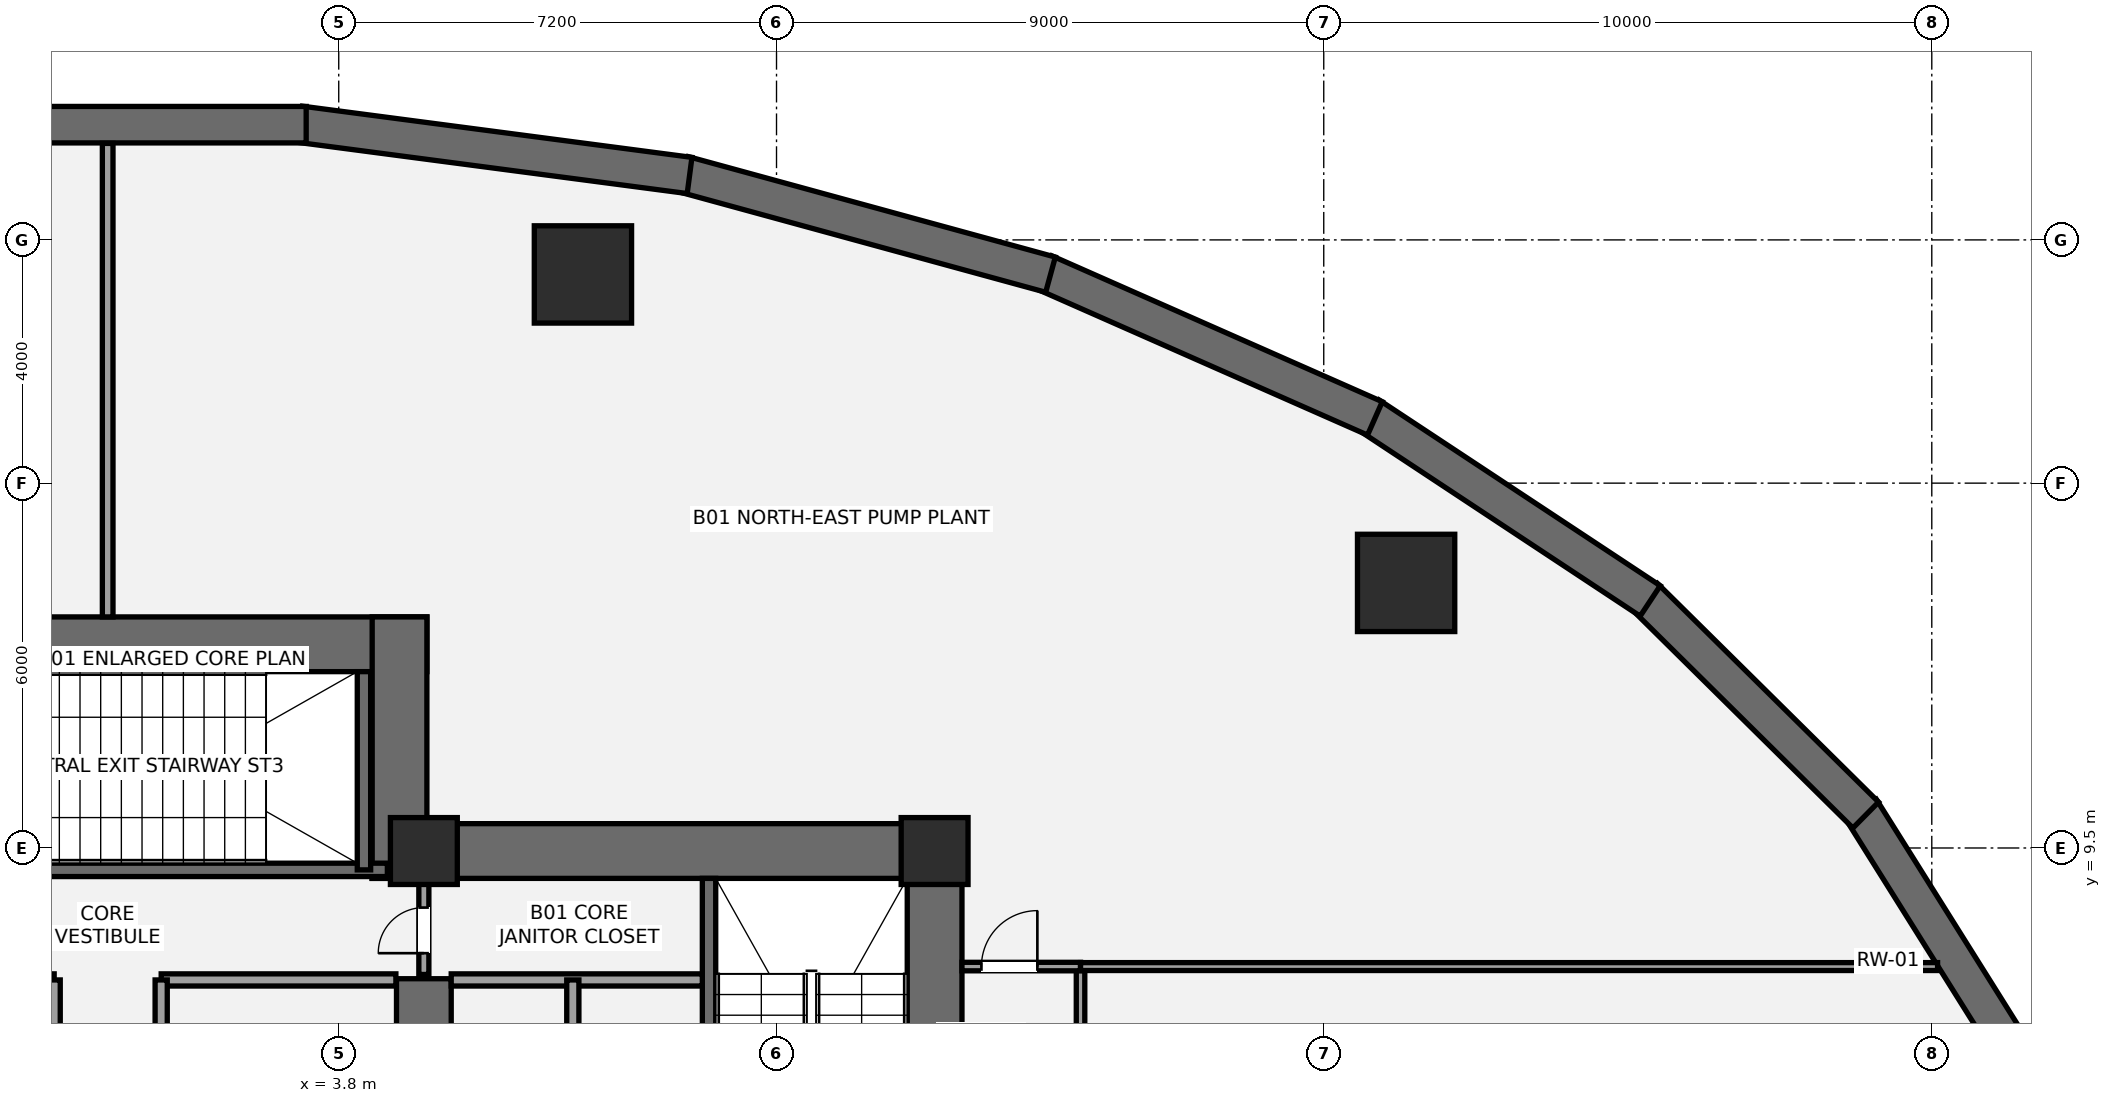
"""IFC4 building model, lengths in metres.
Left out: names, types, materials, properties, quantities, classifications, styles, units other than length and angle.
Written with IfcOpenShell. Run it as: python <this file> out.ifc"""

import sys

from ifc_helpers import new_model, si_unit, direction, frame, frame_2d, origin, origin_2d, place, context, subcontext, project, spatial, rectangle, hollow_circle, extrude, element, fill, save


model = new_model("IFC4")
c1 = context("Model", 3, precision=1e-05, world=origin(), true_north=direction((0.0, 1.0)))
c2 = subcontext(c1, "Body", "Model", "MODEL_VIEW")
j1 = project(units=[si_unit("LENGTHUNIT", "METRE"), si_unit("PLANEANGLEUNIT", "RADIAN")], contexts=[c1])
p1 = place(None, origin())
s1 = spatial("IfcSite", under=j1, at=p1, CompositionType="ELEMENT")
p2 = place(p1, origin())
s2 = spatial("IfcBuilding", under=s1, at=p2, CompositionType="ELEMENT")
p3 = place(p2, frame((0.0, 0.0, -4.4)))
s3 = spatial("IfcBuildingStorey", under=s2, at=p3, CompositionType="ELEMENT", Elevation=-4.4)
p4 = place(p3, frame((31.341, 6.143, 0.0), z_axis=(0.0, 0.0, 1.0), x_axis=(-0.531244363113, 0.847218641592, 0.0)))
e1 = element("IfcWall", 1, at=p4, inside=s3, PredefinedType="USERDEFINED", context=c2, shape_type="SweptSolid", body=[
    extrude(rectangle(XDim=4.72, YDim=0.6, at=frame_2d((2.36, 0.0))), origin(), (0.0, 0.0, 1.0), 4.4),
])
p5 = place(p3, frame((28.914, 10.042, 0.0), z_axis=(0.0, 0.0, 1.0), x_axis=(-0.711105403666, 0.70308541791, 0.0)))
e2 = element("IfcWall", 2, at=p5, inside=s3, PredefinedType="USERDEFINED", context=c2, shape_type="SweptSolid", body=[
    extrude(rectangle(XDim=5.114, YDim=0.6, at=frame_2d((2.557, 0.0))), origin(), (0.0, 0.0, 1.0), 4.4),
])
p6 = place(p3, frame((25.369, 13.563, 0.0), z_axis=(0.0, 0.0, 1.0), x_axis=(-0.834367518908, 0.551208529861, 0.0)))
e3 = element("IfcWall", 3, at=p6, inside=s3, PredefinedType="USERDEFINED", context=c2, shape_type="SweptSolid", body=[
    extrude(rectangle(XDim=5.542, YDim=0.6, at=frame_2d((2.771, 0.0))), origin(), (0.0, 0.0, 1.0), 4.4),
])
p7 = place(p3, frame((20.841, 16.565, 0.0), z_axis=(0.0, 0.0, 1.0), x_axis=(-0.91483072277, 0.403837527574, 0.0)))
e4 = element("IfcWall", 4, at=p7, inside=s3, PredefinedType="USERDEFINED", context=c2, shape_type="SweptSolid", body=[
    extrude(rectangle(XDim=5.94, YDim=0.6, at=frame_2d((2.97, 0.0))), origin(), (0.0, 0.0, 1.0), 4.4),
])
p8 = place(p3, frame((15.506, 18.929, 0.0), z_axis=(0.0, 0.0, 1.0), x_axis=(-0.964548276597, 0.263906464707, 0.0)))
e5 = element("IfcWall", 5, at=p8, inside=s3, PredefinedType="USERDEFINED", context=c2, shape_type="SweptSolid", body=[
    extrude(rectangle(XDim=6.257, YDim=0.6, at=frame_2d((3.128, 0.0))), origin(), (0.0, 0.0, 1.0), 4.4),
])
p9 = place(p3, frame((9.57, 20.56, 0.0), z_axis=(0.0, 0.0, 1.0), x_axis=(-0.991471782517, 0.130321542624, 0.0)))
e6 = element("IfcWall", 6, at=p9, inside=s3, PredefinedType="USERDEFINED", context=c2, shape_type="SweptSolid", body=[
    extrude(rectangle(XDim=6.459, YDim=0.6, at=frame_2d((3.23, 0.0))), origin(), (0.0, 0.0, 1.0), 4.4),
])
p10 = place(p3, frame((3.265, 21.395, 0.0), z_axis=(0.0, 0.0, 1.0), x_axis=(-1.0, 0.0, 0.0)))
e7 = element("IfcWall", 7, at=p10, inside=s3, PredefinedType="USERDEFINED", context=c2, shape_type="SweptSolid", body=[
    extrude(rectangle(XDim=6.529, YDim=0.6, at=frame_2d((3.265, 0.0))), origin(), (0.0, 0.0, 1.0), 4.4),
])
p11 = place(p3, frame((13.6, 0.95, 0.0), z_axis=(0.0, 0.0, 1.0), x_axis=(0.0, 1.0, 0.0)))
e8 = element("IfcWall", 8, at=p11, inside=s3, PredefinedType="SHEAR", context=c2, shape_type="SweptSolid", body=[
    extrude(rectangle(XDim=8.95, YDim=0.9, at=frame_2d((4.475, 0.0))), origin(), (0.0, 0.0, 1.0), 4.4),
])
p12 = place(p3, frame((4.35, 9.45, 0.0), z_axis=(0.0, 0.0, 1.0), x_axis=(1.0, 0.0, 0.0)))
e9 = element("IfcWall", 9, at=p12, inside=s3, PredefinedType="SHEAR", context=c2, shape_type="SweptSolid", body=[
    extrude(rectangle(XDim=9.7, YDim=0.9, at=frame_2d((4.85, 0.0))), origin(), (0.0, 0.0, 1.0), 4.4),
])
p13 = place(p3, frame((5.2, 5.35, 0.0), z_axis=(0.0, 0.0, 1.0), x_axis=(0.0, 1.0, 0.0)))
e10 = element("IfcWall", 10, at=p13, inside=s3, PredefinedType="SHEAR", context=c2, shape_type="SweptSolid", body=[
    extrude(rectangle(XDim=2.0, YDim=0.9, at=frame_2d((1.0, 0.0))), origin(), (0.0, 0.0, 1.0), 4.4),
])
p14 = place(p3, frame((9.89, 1.85, 0.0), z_axis=(0.0, 0.0, 1.0), x_axis=(0.0, 1.0, 0.0)))
e11 = element("IfcWall", 11, at=p14, inside=s3, PredefinedType="SHEAR", context=c2, shape_type="SweptSolid", body=[
    extrude(rectangle(XDim=7.15, YDim=0.22, at=frame_2d((3.575, 0.0))), origin(), (0.0, 0.0, 1.0), 4.4),
])
p15 = place(p3, frame((-5.25, 12.85, 0.0), z_axis=(0.0, 0.0, 1.0), x_axis=(1.0, 0.0, 0.0)))
e12 = element("IfcWall", 12, at=p15, inside=s3, PredefinedType="SHEAR", context=c2, shape_type="SweptSolid", body=[
    extrude(rectangle(XDim=10.5, YDim=0.9, at=frame_2d((5.25, 0.0))), origin(), (0.0, 0.0, 1.0), 4.4),
])
p16 = place(p3, frame((4.8, 9.0, 0.0), z_axis=(0.0, 0.0, 1.0), x_axis=(0.0, 1.0, 0.0)))
e13 = element("IfcWall", 13, at=p16, inside=s3, PredefinedType="SHEAR", context=c2, shape_type="SweptSolid", body=[
    extrude(rectangle(XDim=4.3, YDim=0.9, at=frame_2d((2.15, 0.0))), origin(), (0.0, 0.0, 1.0), 4.4),
])
p17 = place(p3, frame((-4.7, 9.14, 0.0), z_axis=(0.0, 0.0, 1.0), x_axis=(1.0, 0.0, 0.0)))
e14 = element("IfcWall", 14, at=p17, inside=s3, PredefinedType="SHEAR", context=c2, shape_type="SweptSolid", body=[
    extrude(rectangle(XDim=9.3, YDim=0.22, at=frame_2d((4.65, 0.0))), origin(), (0.0, 0.0, 1.0), 4.4),
])
p18 = place(p17, frame((1.15, 0.0, 0.0)))
e15 = element("IfcOpeningElement", 15, at=p18, cuts=e14, PredefinedType="OPENING", context=c2, shape_type="SweptSolid", body=[
    extrude(rectangle(XDim=1.05, YDim=2.15, at=frame_2d((0.525, 1.075))), frame((0.0, 0.12, 0.0), z_axis=(0.0, -1.0, 0.0), x_axis=(1.0, 0.0, 0.0)), (0.0, 0.0, 1.0), 0.24),
])
p19 = place(p3, frame((4.215, 9.14, 0.0), z_axis=(0.0, 0.0, 1.0), x_axis=(0.0, 1.0, 0.0)))
e16 = element("IfcWall", 16, at=p19, inside=s3, PredefinedType="SHEAR", context=c2, shape_type="SweptSolid", body=[
    extrude(rectangle(XDim=3.26, YDim=0.22, at=frame_2d((1.63, 0.0))), origin(), (0.0, 0.0, 1.0), 4.4),
])
for number, where, z_axis, x_axis in (
    (17, (5.2, 9.45, 0.0), (0.0, 0.0, 1.0), (1.0, 0.0, 0.0)),
    (18, (13.6, 9.45, 0.0), (0.0, 0.0, 1.0), (1.0, 0.0, 0.0)),
):
    element("IfcColumn", number, at=place(p3, frame(where, z_axis=z_axis, x_axis=x_axis)), inside=s3, PredefinedType="COLUMN", context=c2, shape_type="SweptSolid", body=[
        extrude(rectangle(XDim=1.1, YDim=1.1, at=origin_2d()), origin(), (0.0, 0.0, 1.0), 4.4),
    ])
for number, where, z_axis, x_axis in (
    (19, (21.354, 13.859, 0.0), (0.0, 0.0, 1.0), (1.0, 0.0, 0.0)),
    (20, (7.816, 18.932, 0.0), (0.0, 0.0, 1.0), (1.0, 0.0, 0.0)),
):
    element("IfcColumn", number, at=place(p3, frame(where, z_axis=z_axis, x_axis=x_axis)), inside=s3, PredefinedType="USERDEFINED", context=c2, shape_type="SweptSolid", body=[
        extrude(hollow_circle(Radius=0.8, WallThickness=0.06, at=origin_2d()), origin(), (0.0, 0.0, 1.0), 4.4),
    ])
p20 = place(p3, frame((5.65, 7.33, 0.0), z_axis=(0.0, 0.0, 1.0), x_axis=(1.0, 0.0, 0.0)))
e21 = element("IfcWall", 21, at=p20, inside=s3, PredefinedType="SOLIDWALL", context=c2, shape_type="SweptSolid", body=[
    extrude(rectangle(XDim=4.13, YDim=0.2, at=frame_2d((2.065, 0.0))), origin(), (0.0, 0.0, 1.0), 4.14),
])
p21 = place(p3, frame((7.65, 5.47, 0.0), z_axis=(0.0, 0.0, 1.0), x_axis=(0.0, 1.0, 0.0)))
e22 = element("IfcWall", 22, at=p21, inside=s3, PredefinedType="SOLIDWALL", context=c2, shape_type="SweptSolid", body=[
    extrude(rectangle(XDim=1.86, YDim=0.2, at=frame_2d((0.93, 0.0))), origin(), (0.0, 0.0, 1.0), 4.14),
])
for number, where, z_axis, x_axis in (
    (23, (-4.74, 7.33, 0.0), (0.0, 0.0, 1.0), (1.0, 0.0, 0.0)),
    (24, (0.88, 7.33, 0.0), (0.0, 0.0, 1.0), (1.0, 0.0, 0.0)),
):
    element("IfcWall", number, at=place(p3, frame(where, z_axis=z_axis, x_axis=x_axis)), inside=s3, PredefinedType="SOLIDWALL", context=c2, shape_type="SweptSolid", body=[
        extrude(rectangle(XDim=3.86, YDim=0.2, at=frame_2d((1.93, 0.0))), origin(), (0.0, 0.0, 1.0), 4.14),
    ])
for number, where, z_axis, x_axis in (
    (25, (-0.88, 5.52, 0.0), (0.0, 0.0, 1.0), (0.0, 1.0, 0.0)),
    (26, (0.88, 5.52, 0.0), (0.0, 0.0, 1.0), (0.0, 1.0, 0.0)),
):
    element("IfcWall", number, at=place(p3, frame(where, z_axis=z_axis, x_axis=x_axis)), inside=s3, PredefinedType="SOLIDWALL", context=c2, shape_type="SweptSolid", body=[
        extrude(rectangle(XDim=1.81, YDim=0.2, at=frame_2d((0.905, 0.0))), origin(), (0.0, 0.0, 1.0), 4.14),
    ])
p22 = place(p3, frame((5.2, 7.42, 0.0), z_axis=(0.0, 0.0, 1.0), x_axis=(0.0, 1.0, 0.0)))
e27 = element("IfcWall", 27, at=p22, inside=s3, PredefinedType="PARTITIONING", context=c2, shape_type="SweptSolid", body=[
    extrude(rectangle(XDim=1.58, YDim=0.165, at=frame_2d((0.79, 0.0))), origin(), (0.0, 0.0, 1.0), 4.14),
])
p23 = place(p22, frame((0.35, 0.0, 0.0)))
e28 = element("IfcOpeningElement", 28, at=p23, cuts=e27, PredefinedType="OPENING", context=c2, shape_type="SweptSolid", body=[
    extrude(rectangle(XDim=0.75, YDim=2.1, at=frame_2d((0.375, 1.05))), frame((0.0, 0.093, 0.0), z_axis=(0.0, -1.0, 0.0), x_axis=(1.0, 0.0, 0.0)), (0.0, 0.0, 1.0), 0.185),
])
p24 = place(p3, frame((16.0, -18.365, 0.0), z_axis=(0.0, 0.0, 1.0), x_axis=(0.0, 1.0, 0.0)))
e29 = element("IfcWall", 29, at=p24, inside=s3, PredefinedType="PARTITIONING", context=c2, shape_type="SweptSolid", body=[
    extrude(rectangle(XDim=25.916, YDim=0.14, at=frame_2d((12.958, 0.0))), origin(), (0.0, 0.0, 1.0), 3.508),
])
p25 = place(p24, frame((15.766, 0.0, 0.0)))
e30 = element("IfcOpeningElement", 30, at=p25, cuts=e29, PredefinedType="OPENING", context=c2, shape_type="SweptSolid", body=[
    extrude(rectangle(XDim=0.9, YDim=2.1, at=frame_2d((0.45, 1.05))), frame((0.0, 0.08, 0.0), z_axis=(0.0, -1.0, 0.0), x_axis=(1.0, 0.0, 0.0)), (0.0, 0.0, 1.0), 0.16),
])
p26 = place(p24, frame((22.441, 0.0, 0.0)))
e31 = element("IfcOpeningElement", 31, at=p26, cuts=e29, PredefinedType="OPENING", context=c2, shape_type="SweptSolid", body=[
    extrude(rectangle(XDim=0.9, YDim=2.1, at=frame_2d((0.45, 1.05))), frame((0.0, 0.08, 0.0), z_axis=(0.0, -1.0, 0.0), x_axis=(1.0, 0.0, 0.0)), (0.0, 0.0, 1.0), 0.16),
])
p27 = place(p3, frame((14.05, 7.55, 0.0), z_axis=(0.0, 0.0, 1.0), x_axis=(1.0, 0.0, 0.0)))
e32 = element("IfcWall", 32, at=p27, inside=s3, PredefinedType="PARTITIONING", context=c2, shape_type="SweptSolid", body=[
    extrude(rectangle(XDim=1.95, YDim=0.14, at=frame_2d((0.975, 0.0))), origin(), (0.0, 0.0, 1.0), 4.14),
])
p28 = place(p27, frame((0.32, 0.0, 0.0)))
e33 = element("IfcOpeningElement", 33, at=p28, cuts=e32, PredefinedType="OPENING", context=c2, shape_type="SweptSolid", body=[
    extrude(rectangle(XDim=0.92, YDim=2.15, at=frame_2d((0.46, 1.075))), frame((0.0, 0.08, 0.0), z_axis=(0.0, -1.0, 0.0), x_axis=(1.0, 0.0, 0.0)), (0.0, 0.0, 1.0), 0.16),
])
p29 = place(p3, frame((0.0, 13.3, 0.0), z_axis=(0.0, 0.0, 1.0), x_axis=(0.0, 1.0, 0.0)))
e34 = element("IfcWall", 34, at=p29, inside=s3, PredefinedType="PARTITIONING", context=c2, shape_type="SweptSolid", body=[
    extrude(rectangle(XDim=7.787, YDim=0.175, at=frame_2d((3.894, 0.0))), origin(), (0.0, 0.0, 1.0), 4.14),
])
p30 = place(p3, frame((16.0, 7.55, 0.0), z_axis=(0.0, 0.0, 1.0), x_axis=(1.0, 0.0, 0.0)))
e35 = element("IfcWall", 35, at=p30, inside=s3, PredefinedType="PARTITIONING", context=c2, shape_type="SweptSolid", body=[
    extrude(rectangle(XDim=14.095, YDim=0.13, at=frame_2d((7.048, 0.0))), origin(), (0.0, 0.0, 1.0), 3.118),
])
p31 = place(p23, origin())
e36 = element("IfcDoor", 36, at=p31, inside=s3, OperationType="SINGLE_SWING_LEFT", PredefinedType="DOOR", context=c2, shape_type="SweptSolid", body=[
    extrude(rectangle(XDim=0.75, YDim=2.1, at=frame_2d((0.375, 1.05))), frame((0.0, 0.025, 0.0), z_axis=(0.0, -1.0, 0.0), x_axis=(1.0, 0.0, 0.0)), (0.0, 0.0, 1.0), 0.05),
])
fill(e28, e36)
p32 = place(p28, origin())
e37 = element("IfcDoor", 37, at=p32, inside=s3, OperationType="SINGLE_SWING_RIGHT", PredefinedType="DOOR", context=c2, shape_type="SweptSolid", body=[
    extrude(rectangle(XDim=0.92, YDim=2.15, at=frame_2d((0.46, 1.075))), frame((0.0, 0.025, 0.0), z_axis=(0.0, -1.0, 0.0), x_axis=(1.0, 0.0, 0.0)), (0.0, 0.0, 1.0), 0.05),
])
fill(e33, e37)
save(model, sys.argv[1])
